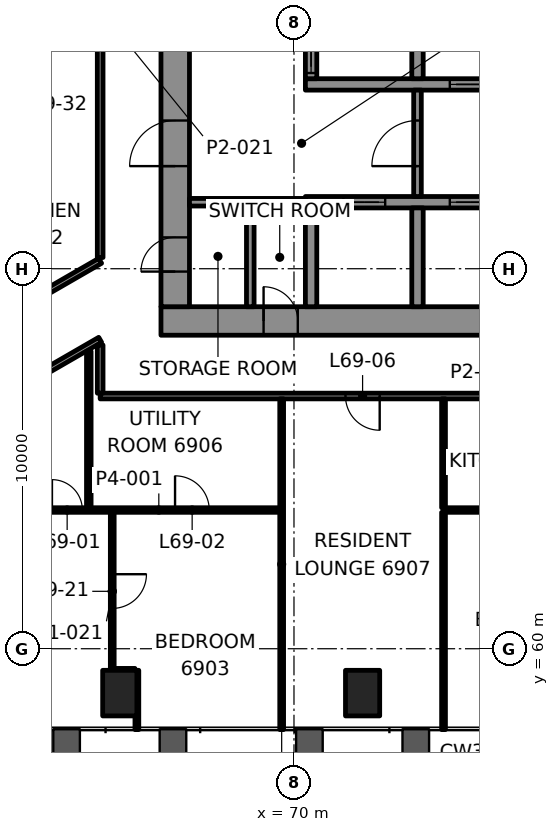
"""IFC4 building model, lengths in metres.
Left out: names, types, materials, properties, quantities, classifications, styles, units other than length and angle.
Written with IfcOpenShell. Run it as: python <this file> out.ifc"""

import sys

from ifc_helpers import new_model, si_unit, direction, frame, frame_2d, origin, origin_2d, place, context, subcontext, project, spatial, rectangle, hollow_rectangle, extrude, element, fill, save


model = new_model("IFC4")
c1 = context("Model", 3, precision=1e-05, world=origin(), true_north=direction((0.0, 1.0)))
c2 = subcontext(c1, "Body", "Model", "MODEL_VIEW")
j1 = project(units=[si_unit("LENGTHUNIT", "METRE"), si_unit("PLANEANGLEUNIT", "RADIAN")], contexts=[c1])
p1 = place(None, origin())
s1 = spatial("IfcSite", under=j1, at=p1, CompositionType="ELEMENT")
p2 = place(p1, origin())
s2 = spatial("IfcBuilding", under=s1, at=p2, CompositionType="ELEMENT")
p3 = place(p2, frame((0.0, 0.0, 288.1)))
s3 = spatial("IfcBuildingStorey", under=s2, at=p3, CompositionType="ELEMENT", Elevation=288.1)
for number, where, z_axis, x_axis in (
    (1, (65.416, 58.832, -0.0), (0.0, 0.0, 1.0), (1.0, 0.0, 0.0)),
    (2, (71.805, 58.832, -0.0), (0.0, 0.0, 1.0), (1.0, 0.0, 0.0)),
):
    element("IfcColumn", number, at=place(p3, frame(where, z_axis=z_axis, x_axis=x_axis)), inside=s3, PredefinedType="COLUMN", context=c2, shape_type="SweptSolid", body=[
        extrude(hollow_rectangle(XDim=0.9, YDim=1.2, WallThickness=0.06, at=origin_2d()), origin(), (0.0, 0.0, 1.0), 3.5),
    ])
p4 = place(p3, frame((66.5, 68.625, 0.0), z_axis=(0.0, 0.0, 1.0), x_axis=(1.0, 0.0, 0.0)))
e3 = element("IfcWall", 3, at=p4, inside=s3, PredefinedType="SHEAR", context=c2, shape_type="SweptSolid", body=[
    extrude(rectangle(XDim=17.0, YDim=0.75, at=frame_2d((8.5, 0.0))), origin(), (0.0, 0.0, 1.0), 3.3),
])
p5 = place(p4, frame((2.7, 0.0, 0.0)))
e4 = element("IfcOpeningElement", 4, at=p5, cuts=e3, PredefinedType="OPENING", context=c2, shape_type="SweptSolid", body=[
    extrude(rectangle(XDim=0.9, YDim=2.1, at=frame_2d((0.45, 1.05))), frame((0.0, 0.385, 0.0), z_axis=(0.0, -1.0, 0.0), x_axis=(1.0, 0.0, 0.0)), (0.0, 0.0, 1.0), 0.77),
])
p6 = place(p3, frame((66.875, 69.0, 0.0), z_axis=(0.0, 0.0, 1.0), x_axis=(0.0, 1.0, 0.0)))
e5 = element("IfcWall", 5, at=p6, inside=s3, PredefinedType="SHEAR", context=c2, shape_type="SweptSolid", body=[
    extrude(rectangle(XDim=12.0, YDim=0.75, at=frame_2d((6.0, 0.0))), origin(), (0.0, 0.0, 1.0), 3.3),
])
p7 = place(p6, frame((3.7, 0.0, 0.0)))
e6 = element("IfcOpeningElement", 6, at=p7, cuts=e5, PredefinedType="OPENING", context=c2, shape_type="SweptSolid", body=[
    extrude(rectangle(XDim=1.2, YDim=2.1, at=frame_2d((0.6, 1.05))), frame((0.0, 0.385, 0.0), z_axis=(0.0, -1.0, 0.0), x_axis=(1.0, 0.0, 0.0)), (0.0, 0.0, 1.0), 0.77),
])
p8 = place(p6, frame((0.925, 0.0, 0.0)))
e7 = element("IfcOpeningElement", 7, at=p8, cuts=e5, PredefinedType="OPENING", context=c2, shape_type="SweptSolid", body=[
    extrude(rectangle(XDim=0.9, YDim=2.1, at=frame_2d((0.45, 1.05))), frame((0.0, 0.385, 0.0), z_axis=(0.0, -1.0, 0.0), x_axis=(1.0, 0.0, 0.0)), (0.0, 0.0, 1.0), 0.77),
])
p9 = place(p3, frame((70.3, 71.75, 0.0), z_axis=(0.0, 0.0, 1.0), x_axis=(1.0, 0.0, 0.0)))
e8 = element("IfcWall", 8, at=p9, inside=s3, PredefinedType="SHEAR", context=c2, shape_type="SweptSolid", body=[
    extrude(rectangle(XDim=11.5, YDim=0.3, at=frame_2d((5.75, 0.0))), origin(), (0.0, 0.0, 1.0), 3.3),
])
p10 = place(p9, frame((1.0, 0.0, 0.0)))
e9 = element("IfcOpeningElement", 9, at=p10, cuts=e8, PredefinedType="OPENING", context=c2, shape_type="SweptSolid", body=[
    extrude(rectangle(XDim=1.1, YDim=2.1, at=frame_2d((0.55, 1.05))), frame((0.0, 0.16, 0.0), z_axis=(0.0, -1.0, 0.0), x_axis=(1.0, 0.0, 0.0)), (0.0, 0.0, 1.0), 0.32),
])
p11 = place(p9, frame((3.8, 0.0, 0.0)))
e10 = element("IfcOpeningElement", 10, at=p11, cuts=e8, PredefinedType="OPENING", context=c2, shape_type="SweptSolid", body=[
    extrude(rectangle(XDim=1.1, YDim=2.1, at=frame_2d((0.55, 1.05))), frame((0.0, 0.16, 0.0), z_axis=(0.0, -1.0, 0.0), x_axis=(1.0, 0.0, 0.0)), (0.0, 0.0, 1.0), 0.32),
])
p12 = place(p9, frame((6.6, 0.0, 0.0)))
e11 = element("IfcOpeningElement", 11, at=p12, cuts=e8, PredefinedType="OPENING", context=c2, shape_type="SweptSolid", body=[
    extrude(rectangle(XDim=1.1, YDim=2.1, at=frame_2d((0.55, 1.05))), frame((0.0, 0.16, 0.0), z_axis=(0.0, -1.0, 0.0), x_axis=(1.0, 0.0, 0.0)), (0.0, 0.0, 1.0), 0.32),
])
p13 = place(p9, frame((9.4, 0.0, 0.0)))
e12 = element("IfcOpeningElement", 12, at=p13, cuts=e8, PredefinedType="OPENING", context=c2, shape_type="SweptSolid", body=[
    extrude(rectangle(XDim=1.1, YDim=2.1, at=frame_2d((0.55, 1.05))), frame((0.0, 0.16, 0.0), z_axis=(0.0, -1.0, 0.0), x_axis=(1.0, 0.0, 0.0)), (0.0, 0.0, 1.0), 0.32),
])
p14 = place(p3, frame((70.3, 74.85, 0.0), z_axis=(0.0, 0.0, 1.0), x_axis=(1.0, 0.0, 0.0)))
e13 = element("IfcWall", 13, at=p14, inside=s3, PredefinedType="SHEAR", context=c2, shape_type="SweptSolid", body=[
    extrude(rectangle(XDim=5.9, YDim=0.3, at=frame_2d((2.95, 0.0))), origin(), (0.0, 0.0, 1.0), 3.3),
])
p15 = place(p14, frame((3.8, 0.0, 0.0)))
e14 = element("IfcOpeningElement", 14, at=p15, cuts=e13, PredefinedType="OPENING", context=c2, shape_type="SweptSolid", body=[
    extrude(rectangle(XDim=1.1, YDim=2.1, at=frame_2d((0.55, 1.05))), frame((0.0, 0.16, 0.0), z_axis=(0.0, -1.0, 0.0), x_axis=(1.0, 0.0, 0.0)), (0.0, 0.0, 1.0), 0.32),
])
p16 = place(p3, frame((70.45, 69.0, 0.0), z_axis=(0.0, 0.0, 1.0), x_axis=(0.0, 1.0, 0.0)))
e15 = element("IfcWall", 15, at=p16, inside=s3, PredefinedType="SHEAR", context=c2, shape_type="SweptSolid", body=[
    extrude(rectangle(XDim=2.6, YDim=0.3, at=frame_2d((1.3, 0.0))), origin(), (0.0, 0.0, 1.0), 3.3),
])
p17 = place(p3, frame((70.45, 75.0, 0.0), z_axis=(0.0, 0.0, 1.0), x_axis=(0.0, 1.0, 0.0)))
e16 = element("IfcWall", 16, at=p17, inside=s3, PredefinedType="SHEAR", context=c2, shape_type="SweptSolid", body=[
    extrude(rectangle(XDim=2.6, YDim=0.3, at=frame_2d((1.3, 0.0))), origin(), (0.0, 0.0, 1.0), 3.3),
])
p18 = place(p17, frame((0.15, 0.0, 0.0)))
e17 = element("IfcOpeningElement", 17, at=p18, cuts=e16, PredefinedType="OPENING", context=c2, shape_type="SweptSolid", body=[
    extrude(rectangle(XDim=1.1, YDim=2.1, at=frame_2d((0.55, 1.05))), frame((0.0, 0.16, 0.0), z_axis=(0.0, -1.0, 0.0), x_axis=(1.0, 0.0, 0.0)), (0.0, 0.0, 1.0), 0.32),
])
for number, where, z_axis, x_axis in (
    (18, (73.25, 69.0, 0.0), (0.0, 0.0, 1.0), (0.0, 1.0, 0.0)),
    (19, (73.25, 75.0, 0.0), (0.0, 0.0, 1.0), (0.0, 1.0, 0.0)),
):
    element("IfcWall", number, at=place(p3, frame(where, z_axis=z_axis, x_axis=x_axis)), inside=s3, PredefinedType="SHEAR", context=c2, shape_type="SweptSolid", body=[
        extrude(rectangle(XDim=2.6, YDim=0.3, at=frame_2d((1.3, 0.0))), origin(), (0.0, 0.0, 1.0), 3.3),
    ])
p19 = place(p3, frame((65.268, 59.432, 0.0), z_axis=(0.0, 0.0, 1.0), x_axis=(1.0, 0.0, 0.0)))
e20 = element("IfcWall", 20, at=p19, inside=s3, PredefinedType="PARTITIONING", context=c2, shape_type="SweptSolid", body=[
    extrude(rectangle(XDim=0.548, YDim=0.1, at=frame_2d((0.274, 0.0))), origin(), (0.0, 0.0, 1.0), 2.7),
])
p20 = place(p3, frame((63.261, 63.65, 0.0), z_axis=(0.0, 0.0, 1.0), x_axis=(1.0, 0.0, 0.0)))
e21 = element("IfcWall", 21, at=p20, inside=s3, PredefinedType="PARTITIONING", context=c2, shape_type="SweptSolid", body=[
    extrude(rectangle(XDim=6.364, YDim=0.12, at=frame_2d((3.182, 0.0))), origin(), (0.0, 0.0, 1.0), 2.7),
])
p21 = place(p20, frame((0.37, 0.0, 0.0)))
e22 = element("IfcOpeningElement", 22, at=p21, cuts=e21, PredefinedType="OPENING", context=c2, shape_type="SweptSolid", body=[
    extrude(rectangle(XDim=0.8, YDim=2.1, at=frame_2d((0.4, 1.05))), frame((0.0, 0.07, 0.0), z_axis=(0.0, -1.0, 0.0), x_axis=(1.0, 0.0, 0.0)), (0.0, 0.0, 1.0), 0.14),
])
p22 = place(p20, frame((3.609, 0.0, 0.0)))
e23 = element("IfcOpeningElement", 23, at=p22, cuts=e21, PredefinedType="OPENING", context=c2, shape_type="SweptSolid", body=[
    extrude(rectangle(XDim=0.9, YDim=2.1, at=frame_2d((0.45, 1.05))), frame((0.0, 0.07, 0.0), z_axis=(0.0, -1.0, 0.0), x_axis=(1.0, 0.0, 0.0)), (0.0, 0.0, 1.0), 0.14),
])
p23 = place(p3, frame((73.935, 63.65, 0.0), z_axis=(0.0, 0.0, 1.0), x_axis=(1.0, 0.0, 0.0)))
e24 = element("IfcWall", 24, at=p23, inside=s3, PredefinedType="PARTITIONING", context=c2, shape_type="SweptSolid", body=[
    extrude(rectangle(XDim=12.924, YDim=0.12, at=frame_2d((6.462, 0.0))), origin(), (0.0, 0.0, 1.0), 2.7),
])
p24 = place(p23, frame((6.197, 0.0, 0.0)))
e25 = element("IfcOpeningElement", 25, at=p24, cuts=e24, PredefinedType="OPENING", context=c2, shape_type="SweptSolid", body=[
    extrude(rectangle(XDim=0.9, YDim=2.1, at=frame_2d((0.45, 1.05))), frame((0.0, 0.07, 0.0), z_axis=(0.0, -1.0, 0.0), x_axis=(1.0, 0.0, 0.0)), (0.0, 0.0, 1.0), 0.14),
])
p25 = place(p23, frame((9.995, 0.0, 0.0)))
e26 = element("IfcOpeningElement", 26, at=p25, cuts=e24, PredefinedType="OPENING", context=c2, shape_type="SweptSolid", body=[
    extrude(rectangle(XDim=0.8, YDim=2.1, at=frame_2d((0.4, 1.05))), frame((0.0, 0.07, 0.0), z_axis=(0.0, -1.0, 0.0), x_axis=(1.0, 0.0, 0.0)), (0.0, 0.0, 1.0), 0.14),
])
p26 = place(p3, frame((85.1, 66.65, 0.0), z_axis=(0.0, 0.0, 1.0), x_axis=(-1.0, 0.0, 0.0)))
e27 = element("IfcWall", 27, at=p26, inside=s3, PredefinedType="PARTITIONING", context=c2, shape_type="SweptSolid", body=[
    extrude(rectangle(XDim=20.2, YDim=0.15, at=frame_2d((10.1, 0.0))), origin(), (0.0, 0.0, 1.0), 2.7),
])
p27 = place(p26, frame((6.405, 0.0, 0.0)))
e28 = element("IfcOpeningElement", 28, at=p27, cuts=e27, PredefinedType="OPENING", context=c2, shape_type="SweptSolid", body=[
    extrude(rectangle(XDim=1.0, YDim=2.1, at=frame_2d((0.5, 1.05))), frame((0.0, 0.085, 0.0), z_axis=(0.0, -1.0, 0.0), x_axis=(1.0, 0.0, 0.0)), (0.0, 0.0, 1.0), 0.17),
])
p28 = place(p26, frame((12.845, 0.0, 0.0)))
e29 = element("IfcOpeningElement", 29, at=p28, cuts=e27, PredefinedType="OPENING", context=c2, shape_type="SweptSolid", body=[
    extrude(rectangle(XDim=0.9, YDim=2.1, at=frame_2d((0.45, 1.05))), frame((0.0, 0.085, 0.0), z_axis=(0.0, -1.0, 0.0), x_axis=(1.0, 0.0, 0.0)), (0.0, 0.0, 1.0), 0.17),
])
p29 = place(p3, frame((64.9, 68.13, 0.0), z_axis=(0.0, 0.0, 1.0), x_axis=(-0.866023199005, -0.500003818771, 0.0)))
e30 = element("IfcWall", 30, at=p29, inside=s3, PredefinedType="PARTITIONING", context=c2, shape_type="SweptSolid", body=[
    extrude(rectangle(XDim=12.719, YDim=0.15, at=frame_2d((6.359, 0.0))), origin(), (0.0, 0.0, 1.0), 2.547),
])
p30 = place(p29, frame((8.364, 0.0, 0.0)))
e31 = element("IfcOpeningElement", 31, at=p30, cuts=e30, PredefinedType="OPENING", context=c2, shape_type="SweptSolid", body=[
    extrude(rectangle(XDim=1.0, YDim=2.1, at=frame_2d((0.5, 1.05))), frame((0.0, 0.085, 0.0), z_axis=(0.0, -1.0, 0.0), x_axis=(1.0, 0.0, 0.0)), (0.0, 0.0, 1.0), 0.17),
])
p31 = place(p3, frame((52.986, 63.329, 0.0), z_axis=(0.0, 0.0, 1.0), x_axis=(0.866027482275, 0.499996399932, 0.0)))
e32 = element("IfcWall", 32, at=p31, inside=s3, PredefinedType="PARTITIONING", context=c2, shape_type="SweptSolid", body=[
    extrude(rectangle(XDim=13.757, YDim=0.15, at=frame_2d((6.879, 0.0))), origin(), (0.0, 0.0, 1.0), 2.7),
])
p32 = place(p31, frame((2.62, 0.0, 0.0)))
e33 = element("IfcOpeningElement", 33, at=p32, cuts=e32, PredefinedType="OPENING", context=c2, shape_type="SweptSolid", body=[
    extrude(rectangle(XDim=0.9, YDim=2.1, at=frame_2d((0.45, 1.05))), frame((0.0, 0.085, 0.0), z_axis=(0.0, -1.0, 0.0), x_axis=(1.0, 0.0, 0.0)), (0.0, 0.0, 1.0), 0.17),
])
p33 = place(p3, frame((73.935, 57.872, 0.0), z_axis=(0.0, 0.0, 1.0), x_axis=(0.0, 1.0, 0.0)))
e34 = element("IfcWall", 34, at=p33, inside=s3, PredefinedType="PARTITIONING", context=c2, shape_type="SweptSolid", body=[
    extrude(rectangle(XDim=5.718, YDim=0.1, at=frame_2d((2.859, 0.0))), origin(), (0.0, 0.0, 1.0), 2.688),
])
p34 = place(p3, frame((69.676, 57.872, 0.0), z_axis=(0.0, 0.0, 1.0), x_axis=(0.0, 1.0, 0.0)))
e35 = element("IfcWall", 35, at=p34, inside=s3, PredefinedType="PARTITIONING", context=c2, shape_type="SweptSolid", body=[
    extrude(rectangle(XDim=8.703, YDim=0.1, at=frame_2d((4.352, 0.0))), origin(), (0.0, 0.0, 1.0), 2.688),
])
p35 = place(p3, frame((65.866, 57.872, 0.0), z_axis=(0.0, 0.0, 1.0), x_axis=(0.0, 1.0, 0.0)))
e36 = element("IfcWall", 36, at=p35, inside=s3, PredefinedType="PARTITIONING", context=c2, shape_type="SweptSolid", body=[
    extrude(rectangle(XDim=1.56, YDim=0.1, at=frame_2d((0.78, 0.0))), origin(), (0.0, 0.0, 1.0), 2.688),
])
p36 = place(p3, frame((65.218, 63.59, 0.0), z_axis=(0.0, 0.0, 1.0), x_axis=(0.0, -1.0, 0.0)))
e37 = element("IfcWall", 37, at=p36, inside=s3, PredefinedType="PARTITIONING", context=c2, shape_type="SweptSolid", body=[
    extrude(rectangle(XDim=4.158, YDim=0.1, at=frame_2d((2.079, 0.0))), origin(), (0.0, 0.0, 1.0), 2.7),
])
p37 = place(p36, frame((1.629, 0.0, 0.0)))
e38 = element("IfcOpeningElement", 38, at=p37, cuts=e37, PredefinedType="OPENING", context=c2, shape_type="SweptSolid", body=[
    extrude(rectangle(XDim=0.9, YDim=2.1, at=frame_2d((0.45, 1.05))), frame((0.0, 0.06, 0.0), z_axis=(0.0, -1.0, 0.0), x_axis=(1.0, 0.0, 0.0)), (0.0, 0.0, 1.0), 0.12),
])
p38 = place(p3, frame((64.9, 66.725, 0.0), z_axis=(0.0, 0.0, 1.0), x_axis=(0.0, 1.0, 0.0)))
e39 = element("IfcWall", 39, at=p38, inside=s3, PredefinedType="PARTITIONING", context=c2, shape_type="SweptSolid", body=[
    extrude(rectangle(XDim=1.268, YDim=0.15, at=frame_2d((0.634, 0.0))), origin(), (0.0, 0.0, 1.0), 2.547),
])
p39 = place(p3, frame((64.9, 70.295, 0.0), z_axis=(0.0, 0.0, 1.0), x_axis=(0.0, 1.0, 0.0)))
e40 = element("IfcWall", 40, at=p39, inside=s3, PredefinedType="PARTITIONING", context=c2, shape_type="SweptSolid", body=[
    extrude(rectangle(XDim=13.055, YDim=0.15, at=frame_2d((6.528, 0.0))), origin(), (0.0, 0.0, 1.0), 2.7),
])
p40 = place(p39, frame((8.07, 0.0, 0.0)))
e41 = element("IfcOpeningElement", 41, at=p40, cuts=e40, PredefinedType="OPENING", context=c2, shape_type="SweptSolid", body=[
    extrude(rectangle(XDim=1.0, YDim=2.1, at=frame_2d((0.5, 1.05))), frame((0.0, 0.085, 0.0), z_axis=(0.0, -1.0, 0.0), x_axis=(1.0, 0.0, 0.0)), (0.0, 0.0, 1.0), 0.17),
])
p41 = place(p3, frame((64.601, 63.71, 0.0), z_axis=(0.0, 0.0, 1.0), x_axis=(0.0, 1.0, 0.0)))
e42 = element("IfcWall", 42, at=p41, inside=s3, PredefinedType="PARTITIONING", context=c2, shape_type="SweptSolid", body=[
    extrude(rectangle(XDim=4.12, YDim=0.12, at=frame_2d((2.06, 0.0))), origin(), (0.0, 0.0, 1.0), 2.547),
])
p42 = place(p3, frame((73.935, 63.71, 0.0), z_axis=(0.0, 0.0, 1.0), x_axis=(0.0, 1.0, 0.0)))
e43 = element("IfcWall", 43, at=p42, inside=s3, PredefinedType="PARTITIONING", context=c2, shape_type="SweptSolid", body=[
    extrude(rectangle(XDim=2.865, YDim=0.1, at=frame_2d((1.433, 0.0))), origin(), (0.0, 0.0, 1.0), 2.7),
])
p43 = place(p3, frame((67.25, 71.75, 0.0), z_axis=(0.0, 0.0, 1.0), x_axis=(1.0, 0.0, 0.0)))
e44 = element("IfcWall", 44, at=p43, inside=s3, PredefinedType="PARTITIONING", context=c2, shape_type="SweptSolid", body=[
    extrude(rectangle(XDim=3.05, YDim=0.2, at=frame_2d((1.525, 0.0))), origin(), (0.0, 0.0, 1.0), 3.3),
])
p44 = place(p3, frame((68.85, 69.0, 0.0), z_axis=(0.0, 0.0, 1.0), x_axis=(0.0, 1.0, 0.0)))
e45 = element("IfcWall", 45, at=p44, inside=s3, PredefinedType="PARTITIONING", context=c2, shape_type="SweptSolid", body=[
    extrude(rectangle(XDim=2.65, YDim=0.2, at=frame_2d((1.325, 0.0))), origin(), (0.0, 0.0, 1.0), 3.3),
])
p45 = place(p3, frame((73.25, 71.9, 0.0), z_axis=(0.0, 0.0, 1.0), x_axis=(0.0, 1.0, 0.0)))
e46 = element("IfcWall", 46, at=p45, inside=s3, PredefinedType="PARTITIONING", context=c2, shape_type="SweptSolid", body=[
    extrude(rectangle(XDim=2.8, YDim=0.2, at=frame_2d((1.4, 0.0))), origin(), (0.0, 0.0, 1.0), 3.3),
])
p46 = place(p45, frame((0.8, 0.0, 0.0)))
e47 = element("IfcOpeningElement", 47, at=p46, cuts=e46, PredefinedType="OPENING", context=c2, shape_type="SweptSolid", body=[
    extrude(rectangle(XDim=1.2, YDim=2.1, at=frame_2d((0.6, 1.05))), frame((0.0, 0.11, 0.0), z_axis=(0.0, -1.0, 0.0), x_axis=(1.0, 0.0, 0.0)), (0.0, 0.0, 1.0), 0.22),
])
p47 = place(p21, origin())
e48 = element("IfcDoor", 48, at=p47, inside=s3, OperationType="SINGLE_SWING_RIGHT", PredefinedType="DOOR", context=c2, shape_type="SweptSolid", body=[
    extrude(rectangle(XDim=0.8, YDim=2.1, at=frame_2d((0.4, 1.05))), frame((0.0, 0.025, 0.0), z_axis=(0.0, -1.0, 0.0), x_axis=(1.0, 0.0, 0.0)), (0.0, 0.0, 1.0), 0.05),
])
fill(e22, e48)
p48 = place(p22, origin())
e49 = element("IfcDoor", 49, at=p48, inside=s3, OperationType="SINGLE_SWING_LEFT", PredefinedType="DOOR", context=c2, shape_type="SweptSolid", body=[
    extrude(rectangle(XDim=0.9, YDim=2.1, at=frame_2d((0.45, 1.05))), frame((0.0, 0.025, 0.0), z_axis=(0.0, -1.0, 0.0), x_axis=(1.0, 0.0, 0.0)), (0.0, 0.0, 1.0), 0.05),
])
fill(e23, e49)
p49 = place(p28, origin())
e50 = element("IfcDoor", 50, at=p49, inside=s3, OperationType="SINGLE_SWING_LEFT", PredefinedType="DOOR", context=c2, shape_type="SweptSolid", body=[
    extrude(rectangle(XDim=0.9, YDim=2.1, at=frame_2d((0.45, 1.05))), frame((0.0, 0.025, 0.0), z_axis=(0.0, -1.0, 0.0), x_axis=(1.0, 0.0, 0.0)), (0.0, 0.0, 1.0), 0.05),
])
fill(e29, e50)
p50 = place(p37, origin())
e51 = element("IfcDoor", 51, at=p50, inside=s3, OperationType="SINGLE_SWING_RIGHT", PredefinedType="DOOR", context=c2, shape_type="SweptSolid", body=[
    extrude(rectangle(XDim=0.9, YDim=2.1, at=frame_2d((0.45, 1.05))), frame((0.0, 0.025, 0.0), z_axis=(0.0, -1.0, 0.0), x_axis=(1.0, 0.0, 0.0)), (0.0, 0.0, 1.0), 0.05),
])
fill(e38, e51)
p51 = place(p10, origin())
e52 = element("IfcDoor", 52, at=p51, inside=s3, OperationType="DOUBLE_DOOR_SLIDING", PredefinedType="DOOR", context=c2, shape_type="SweptSolid", body=[
    extrude(rectangle(XDim=1.1, YDim=2.1, at=frame_2d((0.55, 1.05))), frame((0.0, 0.025, 0.0), z_axis=(0.0, -1.0, 0.0), x_axis=(1.0, 0.0, 0.0)), (0.0, 0.0, 1.0), 0.05),
])
fill(e9, e52)
p52 = place(p11, origin())
e53 = element("IfcDoor", 53, at=p52, inside=s3, OperationType="DOUBLE_DOOR_SLIDING", PredefinedType="DOOR", context=c2, shape_type="SweptSolid", body=[
    extrude(rectangle(XDim=1.1, YDim=2.1, at=frame_2d((0.55, 1.05))), frame((0.0, 0.025, 0.0), z_axis=(0.0, -1.0, 0.0), x_axis=(1.0, 0.0, 0.0)), (0.0, 0.0, 1.0), 0.05),
])
fill(e10, e53)
p53 = place(p18, origin())
e54 = element("IfcDoor", 54, at=p53, inside=s3, OperationType="DOUBLE_DOOR_SLIDING", PredefinedType="DOOR", context=c2, shape_type="SweptSolid", body=[
    extrude(rectangle(XDim=1.1, YDim=2.1, at=frame_2d((0.55, 1.05))), frame((0.0, 0.025, 0.0), z_axis=(0.0, -1.0, 0.0), x_axis=(1.0, 0.0, 0.0)), (0.0, 0.0, 1.0), 0.05),
])
fill(e17, e54)
p54 = place(p15, origin())
e55 = element("IfcDoor", 55, at=p54, inside=s3, OperationType="DOUBLE_DOOR_SLIDING", PredefinedType="DOOR", context=c2, shape_type="SweptSolid", body=[
    extrude(rectangle(XDim=1.1, YDim=2.1, at=frame_2d((0.55, 1.05))), frame((0.0, 0.025, 0.0), z_axis=(0.0, -1.0, 0.0), x_axis=(1.0, 0.0, 0.0)), (0.0, 0.0, 1.0), 0.05),
])
fill(e14, e55)
p55 = place(p46, origin())
e56 = element("IfcDoor", 56, at=p55, inside=s3, OperationType="SINGLE_SWING_LEFT", PredefinedType="DOOR", context=c2, shape_type="SweptSolid", body=[
    extrude(rectangle(XDim=1.2, YDim=2.1, at=frame_2d((0.6, 1.05))), frame((0.0, 0.025, 0.0), z_axis=(0.0, -1.0, 0.0), x_axis=(1.0, 0.0, 0.0)), (0.0, 0.0, 1.0), 0.05),
])
fill(e47, e56)
p56 = place(p7, origin())
e57 = element("IfcDoor", 57, at=p56, inside=s3, OperationType="SINGLE_SWING_RIGHT", PredefinedType="DOOR", context=c2, shape_type="SweptSolid", body=[
    extrude(rectangle(XDim=1.2, YDim=2.1, at=frame_2d((0.6, 1.05))), frame((0.0, 0.095, 0.0), z_axis=(0.0, -1.0, 0.0), x_axis=(1.0, 0.0, 0.0)), (0.0, 0.0, 1.0), 0.19),
])
fill(e6, e57)
p57 = place(p8, origin())
e58 = element("IfcDoor", 58, at=p57, inside=s3, OperationType="SINGLE_SWING_RIGHT", PredefinedType="DOOR", context=c2, shape_type="SweptSolid", body=[
    extrude(rectangle(XDim=0.9, YDim=2.1, at=frame_2d((0.45, 1.05))), frame((0.0, 0.095, 0.0), z_axis=(0.0, -1.0, 0.0), x_axis=(1.0, 0.0, 0.0)), (0.0, 0.0, 1.0), 0.19),
])
fill(e7, e58)
p58 = place(p5, origin())
e59 = element("IfcDoor", 59, at=p58, inside=s3, OperationType="SINGLE_SWING_LEFT", PredefinedType="DOOR", context=c2, shape_type="SweptSolid", body=[
    extrude(rectangle(XDim=0.9, YDim=2.1, at=frame_2d((0.45, 1.05))), frame((0.0, 0.095, 0.0), z_axis=(0.0, -1.0, 0.0), x_axis=(1.0, 0.0, 0.0)), (0.0, 0.0, 1.0), 0.19),
])
fill(e4, e59)
save(model, sys.argv[1])
